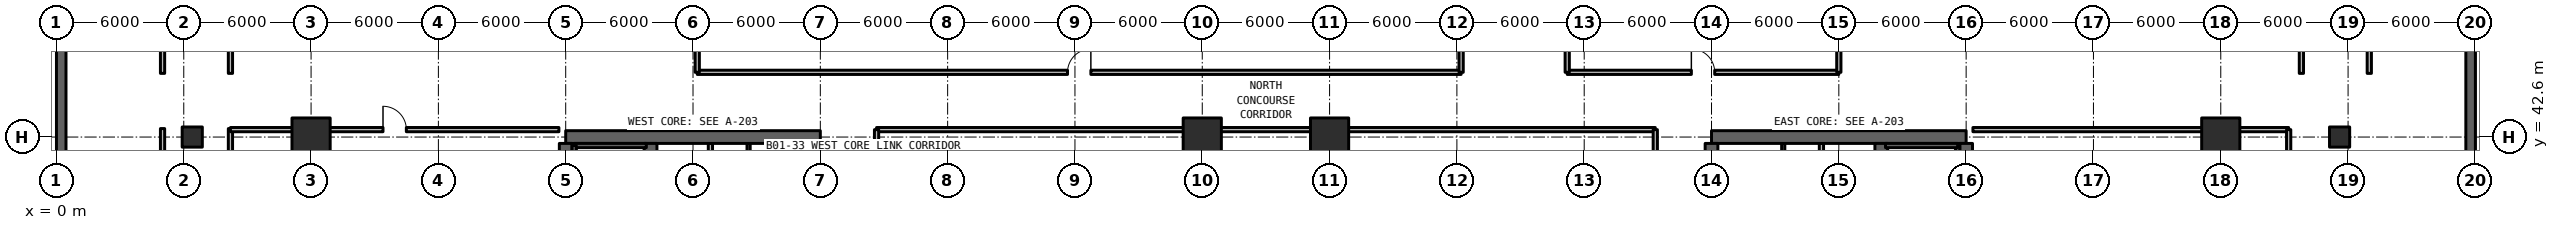
"""IFC4 building model, lengths in metres.
Left out: names, types, materials, properties, quantities, classifications, styles, units other than length and angle.
Written with IfcOpenShell. Run it as: python <this file> out.ifc"""

import sys

from ifc_helpers import new_model, si_unit, direction, frame, frame_2d, origin, origin_2d, place, context, subcontext, project, spatial, rectangle, extrude, element, fill, save


model = new_model("IFC4")
c1 = context("Model", 3, precision=1e-05, world=origin(), true_north=direction((0.0, 1.0)))
c2 = subcontext(c1, "Body", "Model", "MODEL_VIEW")
j1 = project(units=[si_unit("LENGTHUNIT", "METRE"), si_unit("PLANEANGLEUNIT", "RADIAN")], contexts=[c1])
p1 = place(None, origin())
s1 = spatial("IfcSite", under=j1, at=p1, CompositionType="ELEMENT")
p2 = place(p1, origin())
s2 = spatial("IfcBuilding", under=s1, at=p2, CompositionType="ELEMENT")
p3 = place(p2, frame((0.0, 0.0, -4.62)))
s3 = spatial("IfcBuildingStorey", under=s2, at=p3, CompositionType="ELEMENT", Elevation=-4.62)
p4 = place(p3, frame((36.0, 42.6, 0.0), z_axis=(0.0, 0.0, 1.0), x_axis=(-1.0, 0.0, 0.0)))
e1 = element("IfcWall", 1, at=p4, inside=s3, PredefinedType="SHEAR", context=c2, shape_type="SweptSolid", body=[
    extrude(rectangle(XDim=12.0, YDim=0.6, at=frame_2d((6.0, 0.0))), origin(), (0.0, 0.0, 1.0), 4.62),
])
p5 = place(p3, frame((24.0, 24.9, 0.0), z_axis=(0.0, 0.0, 1.0), x_axis=(0.0, 1.0, 0.0)))
e2 = element("IfcWall", 2, at=p5, inside=s3, PredefinedType="SHEAR", context=c2, shape_type="SweptSolid", body=[
    extrude(rectangle(XDim=17.4, YDim=0.6, at=frame_2d((8.7, 0.0))), origin(), (0.0, 0.0, 1.0), 4.62),
])
p6 = place(p3, frame((36.0, 36.8, 0.0), z_axis=(0.0, 0.0, 1.0), x_axis=(0.0, 1.0, 0.0)))
e3 = element("IfcWall", 3, at=p6, inside=s3, PredefinedType="SHEAR", context=c2, shape_type="SweptSolid", body=[
    extrude(rectangle(XDim=5.5, YDim=0.6, at=frame_2d((2.75, 0.0))), origin(), (0.0, 0.0, 1.0), 4.62),
])
p7 = place(p3, frame((28.0, 24.9, 0.0), z_axis=(0.0, 0.0, 1.0), x_axis=(0.0, 1.0, 0.0)))
e4 = element("IfcWall", 4, at=p7, inside=s3, PredefinedType="SHEAR", context=c2, shape_type="SweptSolid", body=[
    extrude(rectangle(XDim=17.4, YDim=0.6, at=frame_2d((8.7, 0.0))), origin(), (0.0, 0.0, 1.0), 4.62),
])
p8 = place(p7, frame((0.35, 0.0, 0.0)))
e5 = element("IfcOpeningElement", 5, at=p8, cuts=e4, PredefinedType="OPENING", context=c2, shape_type="SweptSolid", body=[
    extrude(rectangle(XDim=1.15, YDim=2.15, at=frame_2d((0.575, 1.075))), frame((0.0, 0.31, 0.0), z_axis=(0.0, -1.0, 0.0), x_axis=(1.0, 0.0, 0.0)), (0.0, 0.0, 1.0), 0.62),
])
p9 = place(p7, frame((9.55, 0.0, 0.0)))
e6 = element("IfcOpeningElement", 6, at=p9, cuts=e4, PredefinedType="OPENING", context=c2, shape_type="SweptSolid", body=[
    extrude(rectangle(XDim=1.15, YDim=2.15, at=frame_2d((0.575, 1.075))), frame((0.0, 0.31, 0.0), z_axis=(0.0, -1.0, 0.0), x_axis=(1.0, 0.0, 0.0)), (0.0, 0.0, 1.0), 0.62),
])
p10 = place(p3, frame((90.0, 42.6, 0.0), z_axis=(0.0, 0.0, 1.0), x_axis=(-1.0, 0.0, 0.0)))
e7 = element("IfcWall", 7, at=p10, inside=s3, PredefinedType="SHEAR", context=c2, shape_type="SweptSolid", body=[
    extrude(rectangle(XDim=12.0, YDim=0.6, at=frame_2d((6.0, 0.0))), origin(), (0.0, 0.0, 1.0), 4.62),
])
p11 = place(p3, frame((90.0, 24.9, 0.0), z_axis=(0.0, 0.0, 1.0), x_axis=(0.0, 1.0, 0.0)))
e8 = element("IfcWall", 8, at=p11, inside=s3, PredefinedType="SHEAR", context=c2, shape_type="SweptSolid", body=[
    extrude(rectangle(XDim=17.4, YDim=0.6, at=frame_2d((8.7, 0.0))), origin(), (0.0, 0.0, 1.0), 4.62),
])
p12 = place(p3, frame((78.0, 36.8, 0.0), z_axis=(0.0, 0.0, 1.0), x_axis=(0.0, 1.0, 0.0)))
e9 = element("IfcWall", 9, at=p12, inside=s3, PredefinedType="SHEAR", context=c2, shape_type="SweptSolid", body=[
    extrude(rectangle(XDim=5.5, YDim=0.6, at=frame_2d((2.75, 0.0))), origin(), (0.0, 0.0, 1.0), 4.62),
])
p13 = place(p3, frame((86.0, 24.9, 0.0), z_axis=(0.0, 0.0, 1.0), x_axis=(0.0, 1.0, 0.0)))
e10 = element("IfcWall", 10, at=p13, inside=s3, PredefinedType="SHEAR", context=c2, shape_type="SweptSolid", body=[
    extrude(rectangle(XDim=17.4, YDim=0.6, at=frame_2d((8.7, 0.0))), origin(), (0.0, 0.0, 1.0), 4.62),
])
p14 = place(p13, frame((0.35, 0.0, 0.0)))
e11 = element("IfcOpeningElement", 11, at=p14, cuts=e10, PredefinedType="OPENING", context=c2, shape_type="SweptSolid", body=[
    extrude(rectangle(XDim=1.15, YDim=2.15, at=frame_2d((0.575, 1.075))), frame((0.0, 0.31, 0.0), z_axis=(0.0, -1.0, 0.0), x_axis=(1.0, 0.0, 0.0)), (0.0, 0.0, 1.0), 0.62),
])
p15 = place(p13, frame((9.55, 0.0, 0.0)))
e12 = element("IfcOpeningElement", 12, at=p15, cuts=e10, PredefinedType="OPENING", context=c2, shape_type="SweptSolid", body=[
    extrude(rectangle(XDim=1.15, YDim=2.15, at=frame_2d((0.575, 1.075))), frame((0.0, 0.31, 0.0), z_axis=(0.0, -1.0, 0.0), x_axis=(1.0, 0.0, 0.0)), (0.0, 0.0, 1.0), 0.62),
])
for number, where, z_axis, x_axis in (
    (13, (12.0, 42.6, 0.0), (0.0, 0.0, 1.0), (1.0, 0.0, 0.0)),
    (14, (54.0, 42.6, 0.0), (0.0, 0.0, 1.0), (1.0, 0.0, 0.0)),
    (15, (60.0, 42.6, 0.0), (0.0, 0.0, 1.0), (1.0, 0.0, 0.0)),
    (16, (102.0, 42.6, 0.0), (0.0, 0.0, 1.0), (1.0, 0.0, 0.0)),
):
    element("IfcColumn", number, at=place(p3, frame(where, z_axis=z_axis, x_axis=x_axis)), inside=s3, PredefinedType="COLUMN", context=c2, shape_type="SweptSolid", body=[
        extrude(rectangle(XDim=1.8, YDim=1.8, at=origin_2d()), origin(), (0.0, 0.0, 1.0), 4.62),
    ])
for number, where, z_axis, x_axis in (
    (17, (6.4, 42.6, 0.0), (0.0, 0.0, 1.0), (1.0, 0.0, 0.0)),
    (18, (107.6, 42.6, 0.0), (0.0, 0.0, 1.0), (1.0, 0.0, 0.0)),
):
    element("IfcColumn", number, at=place(p3, frame(where, z_axis=z_axis, x_axis=x_axis)), inside=s3, PredefinedType="COLUMN", context=c2, shape_type="SweptSolid", body=[
        extrude(rectangle(XDim=0.95, YDim=0.95, at=origin_2d()), origin(), (0.0, 0.0, 1.0), 4.34),
    ])
for number, where, z_axis, x_axis in (
    (19, (113.775, 0.225, 0.0), (0.0, 0.0, 1.0), (0.0, 1.0, 0.0)),
    (20, (0.225, 66.975, 0.0), (0.0, 0.0, 1.0), (0.0, -1.0, 0.0)),
):
    element("IfcWall", number, at=place(p3, frame(where, z_axis=z_axis, x_axis=x_axis)), inside=s3, PredefinedType="USERDEFINED", context=c2, shape_type="SweptSolid", body=[
        extrude(rectangle(XDim=66.75, YDim=0.45, at=frame_2d((33.375, 0.0))), origin(), (0.0, 0.0, 1.0), 4.34),
    ])
p16 = place(p3, frame((30.82, 36.88, 0.0), z_axis=(0.0, 0.0, 1.0), x_axis=(0.0, 1.0, 0.0)))
e21 = element("IfcWall", 21, at=p16, inside=s3, PredefinedType="SOLIDWALL", context=c2, shape_type="SweptSolid", body=[
    extrude(rectangle(XDim=5.42, YDim=0.2, at=frame_2d((2.71, 0.0))), origin(), (0.0, 0.0, 1.0), 3.56),
])
p17 = place(p16, frame((2.1, 0.0, 0.0)))
e22 = element("IfcOpeningElement", 22, at=p17, cuts=e21, PredefinedType="OPENING", context=c2, shape_type="SweptSolid", body=[
    extrude(rectangle(XDim=0.95, YDim=2.15, at=frame_2d((0.475, 1.075))), frame((0.0, 0.11, 0.0), z_axis=(0.0, -1.0, 0.0), x_axis=(1.0, 0.0, 0.0)), (0.0, 0.0, 1.0), 0.22),
])
p18 = place(p3, frame((32.62, 36.88, 0.0), z_axis=(0.0, 0.0, 1.0), x_axis=(0.0, 1.0, 0.0)))
e23 = element("IfcWall", 23, at=p18, inside=s3, PredefinedType="SOLIDWALL", context=c2, shape_type="SweptSolid", body=[
    extrude(rectangle(XDim=5.42, YDim=0.15, at=frame_2d((2.71, 0.0))), origin(), (0.0, 0.0, 1.0), 3.56),
])
p19 = place(p18, frame((0.8, 0.0, 0.0)))
e24 = element("IfcOpeningElement", 24, at=p19, cuts=e23, PredefinedType="OPENING", context=c2, shape_type="SweptSolid", body=[
    extrude(rectangle(XDim=0.95, YDim=2.15, at=frame_2d((0.475, 1.075))), frame((0.0, 0.085, 0.0), z_axis=(0.0, -1.0, 0.0), x_axis=(1.0, 0.0, 0.0)), (0.0, 0.0, 1.0), 0.17),
])
p20 = place(p18, frame((3.55, 0.0, 0.0)))
e25 = element("IfcOpeningElement", 25, at=p20, cuts=e23, PredefinedType="OPENING", context=c2, shape_type="SweptSolid", body=[
    extrude(rectangle(XDim=0.95, YDim=2.15, at=frame_2d((0.475, 1.075))), frame((0.0, 0.085, 0.0), z_axis=(0.0, -1.0, 0.0), x_axis=(1.0, 0.0, 0.0)), (0.0, 0.0, 1.0), 0.17),
])
p21 = place(p3, frame((83.18, 36.88, 0.0), z_axis=(0.0, 0.0, 1.0), x_axis=(0.0, 1.0, 0.0)))
e26 = element("IfcWall", 26, at=p21, inside=s3, PredefinedType="SOLIDWALL", context=c2, shape_type="SweptSolid", body=[
    extrude(rectangle(XDim=5.42, YDim=0.2, at=frame_2d((2.71, 0.0))), origin(), (0.0, 0.0, 1.0), 3.56),
])
p22 = place(p21, frame((2.1, 0.0, 0.0)))
e27 = element("IfcOpeningElement", 27, at=p22, cuts=e26, PredefinedType="OPENING", context=c2, shape_type="SweptSolid", body=[
    extrude(rectangle(XDim=0.95, YDim=2.15, at=frame_2d((0.475, 1.075))), frame((0.0, 0.11, 0.0), z_axis=(0.0, -1.0, 0.0), x_axis=(1.0, 0.0, 0.0)), (0.0, 0.0, 1.0), 0.22),
])
p23 = place(p3, frame((81.38, 36.88, 0.0), z_axis=(0.0, 0.0, 1.0), x_axis=(0.0, 1.0, 0.0)))
e28 = element("IfcWall", 28, at=p23, inside=s3, PredefinedType="SOLIDWALL", context=c2, shape_type="SweptSolid", body=[
    extrude(rectangle(XDim=5.42, YDim=0.15, at=frame_2d((2.71, 0.0))), origin(), (0.0, 0.0, 1.0), 3.56),
])
p24 = place(p23, frame((0.8, 0.0, 0.0)))
e29 = element("IfcOpeningElement", 29, at=p24, cuts=e28, PredefinedType="OPENING", context=c2, shape_type="SweptSolid", body=[
    extrude(rectangle(XDim=0.95, YDim=2.15, at=frame_2d((0.475, 1.075))), frame((0.0, 0.085, 0.0), z_axis=(0.0, -1.0, 0.0), x_axis=(1.0, 0.0, 0.0)), (0.0, 0.0, 1.0), 0.17),
])
p25 = place(p23, frame((3.55, 0.0, 0.0)))
e30 = element("IfcOpeningElement", 30, at=p25, cuts=e28, PredefinedType="OPENING", context=c2, shape_type="SweptSolid", body=[
    extrude(rectangle(XDim=0.95, YDim=2.15, at=frame_2d((0.475, 1.075))), frame((0.0, 0.085, 0.0), z_axis=(0.0, -1.0, 0.0), x_axis=(1.0, 0.0, 0.0)), (0.0, 0.0, 1.0), 0.17),
])
for number, where, z_axis, x_axis in (
    (31, (5.0, 45.6, 0.0), (0.0, 0.0, 1.0), (0.0, 1.0, 0.0)),
    (32, (8.2, 45.6, 0.0), (0.0, 0.0, 1.0), (0.0, 1.0, 0.0)),
    (33, (105.8, 45.6, 0.0), (0.0, 0.0, 1.0), (0.0, 1.0, 0.0)),
    (34, (109.0, 45.6, 0.0), (0.0, 0.0, 1.0), (0.0, 1.0, 0.0)),
):
    element("IfcWall", number, at=place(p3, frame(where, z_axis=z_axis, x_axis=x_axis)), inside=s3, PredefinedType="SOLIDWALL", context=c2, shape_type="SweptSolid", body=[
        extrude(rectangle(XDim=5.7, YDim=0.2, at=frame_2d((2.85, 0.0))), origin(), (0.0, 0.0, 1.0), 3.56),
    ])
for number, where, z_axis, x_axis in (
    (35, (5.0, 15.9, 0.0), (0.0, 0.0, 1.0), (0.0, 1.0, 0.0)),
    (36, (8.2, 15.9, 0.0), (0.0, 0.0, 1.0), (0.0, 1.0, 0.0)),
):
    element("IfcWall", number, at=place(p3, frame(where, z_axis=z_axis, x_axis=x_axis)), inside=s3, PredefinedType="SOLIDWALL", context=c2, shape_type="SweptSolid", body=[
        extrude(rectangle(XDim=27.1, YDim=0.2, at=frame_2d((13.55, 0.0))), origin(), (0.0, 0.0, 1.0), 3.56),
    ])
p26 = place(p3, frame((8.2, 42.95, 0.0), z_axis=(0.0, 0.0, 1.0), x_axis=(1.0, 0.0, 0.0)))
e37 = element("IfcWall", 37, at=p26, inside=s3, PredefinedType="SOLIDWALL", context=c2, shape_type="SweptSolid", body=[
    extrude(rectangle(XDim=15.48, YDim=0.2, at=frame_2d((7.74, 0.0))), origin(), (0.0, 0.0, 1.0), 3.56),
])
p27 = place(p26, frame((7.19, 0.0, 0.0)))
e38 = element("IfcOpeningElement", 38, at=p27, cuts=e37, PredefinedType="OPENING", context=c2, shape_type="SweptSolid", body=[
    extrude(rectangle(XDim=1.1, YDim=2.15, at=frame_2d((0.55, 1.075))), frame((0.0, 0.11, 0.0), z_axis=(0.0, -1.0, 0.0), x_axis=(1.0, 0.0, 0.0)), (0.0, 0.0, 1.0), 0.22),
])
p28 = place(p3, frame((90.32, 42.95, 0.0), z_axis=(0.0, 0.0, 1.0), x_axis=(1.0, 0.0, 0.0)))
e39 = element("IfcWall", 39, at=p28, inside=s3, PredefinedType="SOLIDWALL", context=c2, shape_type="SweptSolid", body=[
    extrude(rectangle(XDim=14.88, YDim=0.2, at=frame_2d((7.44, 0.0))), origin(), (0.0, 0.0, 1.0), 3.56),
])
p29 = place(p3, frame((105.2, 24.25, 0.0), z_axis=(0.0, 0.0, 1.0), x_axis=(0.0, 1.0, 0.0)))
e40 = element("IfcWall", 40, at=p29, inside=s3, PredefinedType="SOLIDWALL", context=c2, shape_type="SweptSolid", body=[
    extrude(rectangle(XDim=18.7, YDim=0.2, at=frame_2d((9.35, 0.0))), origin(), (0.0, 0.0, 1.0), 3.56),
])
p30 = place(p3, frame((38.65, 42.95, 0.0), z_axis=(0.0, 0.0, 1.0), x_axis=(1.0, 0.0, 0.0)))
e41 = element("IfcWall", 41, at=p30, inside=s3, PredefinedType="SOLIDWALL", context=c2, shape_type="SweptSolid", body=[
    extrude(rectangle(XDim=36.7, YDim=0.2, at=frame_2d((18.35, 0.0))), origin(), (0.0, 0.0, 1.0), 3.56),
])
p31 = place(p3, frame((38.65, 24.25, 0.0), z_axis=(0.0, 0.0, 1.0), x_axis=(0.0, 1.0, 0.0)))
e42 = element("IfcWall", 42, at=p31, inside=s3, PredefinedType="SOLIDWALL", context=c2, shape_type="SweptSolid", body=[
    extrude(rectangle(XDim=18.7, YDim=0.2, at=frame_2d((9.35, 0.0))), origin(), (0.0, 0.0, 1.0), 3.56),
])
p32 = place(p31, frame((8.45, 0.0, 0.0)))
e43 = element("IfcOpeningElement", 43, at=p32, cuts=e42, PredefinedType="OPENING", context=c2, shape_type="SweptSolid", body=[
    extrude(rectangle(XDim=1.1, YDim=2.15, at=frame_2d((0.55, 1.075))), frame((0.0, 0.11, 0.0), z_axis=(0.0, -1.0, 0.0), x_axis=(1.0, 0.0, 0.0)), (0.0, 0.0, 1.0), 0.22),
])
p33 = place(p3, frame((75.35, 24.25, 0.0), z_axis=(0.0, 0.0, 1.0), x_axis=(0.0, 1.0, 0.0)))
e44 = element("IfcWall", 44, at=p33, inside=s3, PredefinedType="SOLIDWALL", context=c2, shape_type="SweptSolid", body=[
    extrude(rectangle(XDim=18.7, YDim=0.2, at=frame_2d((9.35, 0.0))), origin(), (0.0, 0.0, 1.0), 3.56),
])
p34 = place(p3, frame((30.2, 45.65, 0.0), z_axis=(0.0, 0.0, 1.0), x_axis=(1.0, 0.0, 0.0)))
e45 = element("IfcWall", 45, at=p34, inside=s3, PredefinedType="SOLIDWALL", context=c2, shape_type="SweptSolid", body=[
    extrude(rectangle(XDim=36.0, YDim=0.2, at=frame_2d((18.0, 0.0))), origin(), (0.0, 0.0, 1.0), 3.56),
])
p35 = place(p34, frame((17.45, 0.0, 0.0)))
e46 = element("IfcOpeningElement", 46, at=p35, cuts=e45, PredefinedType="OPENING", context=c2, shape_type="SweptSolid", body=[
    extrude(rectangle(XDim=1.1, YDim=2.15, at=frame_2d((0.55, 1.075))), frame((0.0, 0.11, 0.0), z_axis=(0.0, -1.0, 0.0), x_axis=(1.0, 0.0, 0.0)), (0.0, 0.0, 1.0), 0.22),
])
for number, where, z_axis, x_axis in (
    (47, (30.2, 45.65, 0.0), (0.0, 0.0, 1.0), (0.0, 1.0, 0.0)),
    (48, (66.2, 45.65, 0.0), (0.0, 0.0, 1.0), (0.0, 1.0, 0.0)),
):
    element("IfcWall", number, at=place(p3, frame(where, z_axis=z_axis, x_axis=x_axis)), inside=s3, PredefinedType="SOLIDWALL", context=c2, shape_type="SweptSolid", body=[
        extrude(rectangle(XDim=21.1, YDim=0.2, at=frame_2d((10.55, 0.0))), origin(), (0.0, 0.0, 1.0), 3.56),
    ])
p36 = place(p3, frame((71.2, 45.65, 0.0), z_axis=(0.0, 0.0, 1.0), x_axis=(1.0, 0.0, 0.0)))
e49 = element("IfcWall", 49, at=p36, inside=s3, PredefinedType="SOLIDWALL", context=c2, shape_type="SweptSolid", body=[
    extrude(rectangle(XDim=12.8, YDim=0.2, at=frame_2d((6.4, 0.0))), origin(), (0.0, 0.0, 1.0), 3.56),
])
p37 = place(p36, frame((5.85, 0.0, 0.0)))
e50 = element("IfcOpeningElement", 50, at=p37, cuts=e49, PredefinedType="OPENING", context=c2, shape_type="SweptSolid", body=[
    extrude(rectangle(XDim=1.1, YDim=2.15, at=frame_2d((0.55, 1.075))), frame((0.0, 0.11, 0.0), z_axis=(0.0, -1.0, 0.0), x_axis=(1.0, 0.0, 0.0)), (0.0, 0.0, 1.0), 0.22),
])
for number, where, z_axis, x_axis in (
    (51, (71.2, 45.65, 0.0), (0.0, 0.0, 1.0), (0.0, 1.0, 0.0)),
    (52, (84.0, 45.65, 0.0), (0.0, 0.0, 1.0), (0.0, 1.0, 0.0)),
):
    element("IfcWall", number, at=place(p3, frame(where, z_axis=z_axis, x_axis=x_axis)), inside=s3, PredefinedType="SOLIDWALL", context=c2, shape_type="SweptSolid", body=[
        extrude(rectangle(XDim=21.1, YDim=0.2, at=frame_2d((10.55, 0.0))), origin(), (0.0, 0.0, 1.0), 3.56),
    ])
p38 = place(p3, frame((27.8, 42.2, 0.0), z_axis=(0.0, 0.0, 1.0), x_axis=(-1.0, 0.0, 0.0)))
e53 = element("IfcWall", 53, at=p38, inside=s3, PredefinedType="SOLIDWALL", context=c2, shape_type="SweptSolid", body=[
    extrude(rectangle(XDim=3.4, YDim=0.2, at=frame_2d((1.7, 0.0))), origin(), (0.0, 0.0, 1.0), 4.62),
])
for number, where, z_axis, x_axis in (
    (54, (24.4, 42.2, 0.0), (0.0, 0.0, 1.0), (0.0, -1.0, 0.0)),
    (55, (89.6, 34.2, 0.0), (0.0, 0.0, 1.0), (0.0, 1.0, 0.0)),
):
    element("IfcWall", number, at=place(p3, frame(where, z_axis=z_axis, x_axis=x_axis)), inside=s3, PredefinedType="SOLIDWALL", context=c2, shape_type="SweptSolid", body=[
        extrude(rectangle(XDim=8.0, YDim=0.2, at=frame_2d((4.0, 0.0))), origin(), (0.0, 0.0, 1.0), 4.62),
    ])
p39 = place(p3, frame((89.6, 42.2, 0.0), z_axis=(0.0, 0.0, 1.0), x_axis=(-1.0, 0.0, 0.0)))
e56 = element("IfcWall", 56, at=p39, inside=s3, PredefinedType="SOLIDWALL", context=c2, shape_type="SweptSolid", body=[
    extrude(rectangle(XDim=3.4, YDim=0.2, at=frame_2d((1.7, 0.0))), origin(), (0.0, 0.0, 1.0), 4.62),
])
p40 = place(p27, origin())
e57 = element("IfcDoor", 57, at=p40, inside=s3, OperationType="SINGLE_SWING_LEFT", PredefinedType="DOOR", context=c2, shape_type="SweptSolid", body=[
    extrude(rectangle(XDim=1.1, YDim=2.15, at=frame_2d((0.55, 1.075))), frame((0.0, 0.025, 0.0), z_axis=(0.0, -1.0, 0.0), x_axis=(1.0, 0.0, 0.0)), (0.0, 0.0, 1.0), 0.05),
])
fill(e38, e57)
p41 = place(p35, origin())
e58 = element("IfcDoor", 58, at=p41, inside=s3, OperationType="SINGLE_SWING_RIGHT", PredefinedType="DOOR", context=c2, shape_type="SweptSolid", body=[
    extrude(rectangle(XDim=1.1, YDim=2.15, at=frame_2d((0.55, 1.075))), frame((0.0, 0.025, 0.0), z_axis=(0.0, -1.0, 0.0), x_axis=(1.0, 0.0, 0.0)), (0.0, 0.0, 1.0), 0.05),
])
fill(e46, e58)
p42 = place(p37, origin())
e59 = element("IfcDoor", 59, at=p42, inside=s3, OperationType="SINGLE_SWING_LEFT", PredefinedType="DOOR", context=c2, shape_type="SweptSolid", body=[
    extrude(rectangle(XDim=1.1, YDim=2.15, at=frame_2d((0.55, 1.075))), frame((0.0, 0.025, 0.0), z_axis=(0.0, -1.0, 0.0), x_axis=(1.0, 0.0, 0.0)), (0.0, 0.0, 1.0), 0.05),
])
fill(e50, e59)
save(model, sys.argv[1])
